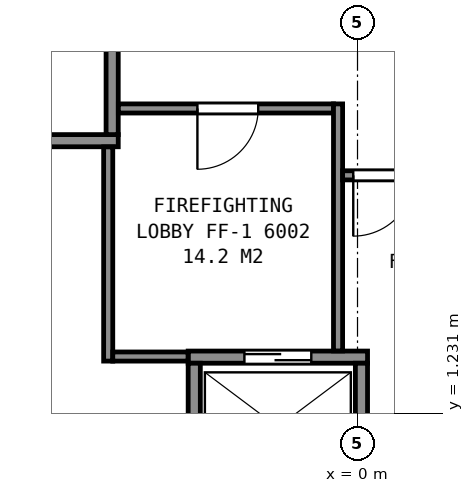
"""IFC4 building model, lengths in metres.
Left out: names, types, materials, properties, quantities, classifications, styles, units other than length and angle.
Written with IfcOpenShell. Run it as: python <this file> out.ifc"""

import sys

from ifc_helpers import new_model, si_unit, direction, frame, frame_2d, origin, place, context, subcontext, project, spatial, rectangle, extrude, element, fill, save


model = new_model("IFC4")
c1 = context("Model", 3, precision=1e-05, world=origin(), true_north=direction((0.0, 1.0)))
c2 = subcontext(c1, "Body", "Model", "MODEL_VIEW")
j1 = project(units=[si_unit("LENGTHUNIT", "METRE"), si_unit("PLANEANGLEUNIT", "RADIAN")], contexts=[c1])
p1 = place(None, origin())
s1 = spatial("IfcSite", under=j1, at=p1, CompositionType="ELEMENT")
p2 = place(p1, origin())
s2 = spatial("IfcBuilding", under=s1, at=p2, CompositionType="ELEMENT")
p3 = place(p2, frame((0.0, 0.0, 239.7)))
s3 = spatial("IfcBuildingStorey", under=s2, at=p3, CompositionType="ELEMENT", Elevation=239.7)
p4 = place(p3, frame((-2.785, 2.15, 0.0), z_axis=(0.0, 0.0, 1.0), x_axis=(1.0, 0.0, 0.0)))
e1 = element("IfcWall", 1, at=p4, inside=s3, PredefinedType="PARTITIONING", context=c2, shape_type="SweptSolid", body=[
    extrude(rectangle(XDim=2.95, YDim=0.2, at=frame_2d((1.475, 0.0))), origin(), (0.0, 0.0, 1.0), 3.7),
])
p5 = place(p4, frame((0.925, 0.0, 0.0)))
e2 = element("IfcOpeningElement", 2, at=p5, cuts=e1, PredefinedType="OPENING", context=c2, shape_type="SweptSolid", body=[
    extrude(rectangle(XDim=1.1, YDim=2.1, at=frame_2d((0.55, 1.05))), frame((0.0, 0.11, 0.0), z_axis=(0.0, -1.0, 0.0), x_axis=(1.0, 0.0, 0.0)), (0.0, 0.0, 1.0), 0.22),
])
p6 = place(p3, frame((-6.285, 5.71, 0.0), z_axis=(0.0, 0.0, 1.0), x_axis=(1.0, 0.0, 0.0)))
e3 = element("IfcWall", 3, at=p6, inside=s3, PredefinedType="PARTITIONING", context=c2, shape_type="SweptSolid", body=[
    extrude(rectangle(XDim=2.35, YDim=0.2, at=frame_2d((1.175, 0.0))), origin(), (0.0, 0.0, 1.0), 3.7),
])
for number, where, z_axis, x_axis in (
    (4, (0.065, 0.1, 0.0), (0.0, 0.0, 1.0), (0.0, 1.0, 0.0)),
    (5, (-2.685, 0.1, 0.0), (0.0, 0.0, 1.0), (0.0, 1.0, 0.0)),
):
    element("IfcWall", number, at=place(p3, frame(where, z_axis=z_axis, x_axis=x_axis)), inside=s3, PredefinedType="PARTITIONING", context=c2, shape_type="SweptSolid", body=[
        extrude(rectangle(XDim=1.95, YDim=0.2, at=frame_2d((0.975, 0.0))), origin(), (0.0, 0.0, 1.0), 3.7),
    ])
p7 = place(p3, frame((-4.035, 5.81, 0.0), z_axis=(0.0, 0.0, 1.0), x_axis=(0.0, 1.0, 0.0)))
e6 = element("IfcWall", 6, at=p7, inside=s3, PredefinedType="PARTITIONING", context=c2, shape_type="SweptSolid", body=[
    extrude(rectangle(XDim=1.75, YDim=0.2, at=frame_2d((0.875, 0.0))), origin(), (0.0, 0.0, 1.0), 3.7),
])
p8 = place(p3, frame((-4.1, 2.085, 0.0), z_axis=(0.0, 0.0, 1.0), x_axis=(0.0, 1.0, 0.0)))
e7 = element("IfcWall", 7, at=p8, inside=s3, PredefinedType="PARTITIONING", context=c2, shape_type="SweptSolid", body=[
    extrude(rectangle(XDim=3.523, YDim=0.15, at=frame_2d((1.761, 0.0))), origin(), (0.0, 0.0, 1.0), 3.45),
])
p9 = place(p3, frame((-4.025, 2.16, 0.0), z_axis=(0.0, 0.0, 1.0), x_axis=(1.0, 0.0, 0.0)))
e8 = element("IfcWall", 8, at=p9, inside=s3, PredefinedType="PARTITIONING", context=c2, shape_type="SweptSolid", body=[
    extrude(rectangle(XDim=1.238, YDim=0.15, at=frame_2d((0.619, 0.0))), origin(), (0.0, 0.0, 1.0), 3.45),
])
p10 = place(p3, frame((-3.933, 6.24, 0.0), z_axis=(0.0, 0.0, 1.0), x_axis=(1.0, 0.0, 0.0)))
e9 = element("IfcWall", 9, at=p10, inside=s3, PredefinedType="PARTITIONING", context=c2, shape_type="SweptSolid", body=[
    extrude(rectangle(XDim=3.538, YDim=0.15, at=frame_2d((1.769, 0.0))), origin(), (0.0, 0.0, 1.0), 3.45),
])
p11 = place(p10, frame((1.3, 0.0, 0.0)))
e10 = element("IfcOpeningElement", 10, at=p11, cuts=e9, PredefinedType="OPENING", context=c2, shape_type="SweptSolid", body=[
    extrude(rectangle(XDim=1.0, YDim=2.1, at=frame_2d((0.5, 1.05))), frame((0.0, 0.085, 0.0), z_axis=(0.0, -1.0, 0.0), x_axis=(1.0, 0.0, 0.0)), (0.0, 0.0, 1.0), 0.17),
])
p12 = place(p3, frame((-0.32, 2.252, 0.0), z_axis=(0.0, 0.0, 1.0), x_axis=(0.0, 1.0, 0.0)))
e11 = element("IfcWall", 11, at=p12, inside=s3, PredefinedType="PARTITIONING", context=c2, shape_type="SweptSolid", body=[
    extrude(rectangle(XDim=4.063, YDim=0.15, at=frame_2d((2.031, 0.0))), origin(), (0.0, 0.0, 1.0), 3.45),
])
p13 = place(p3, frame((-0.245, 5.14, 0.0), z_axis=(0.0, 0.0, 1.0), x_axis=(1.0, 0.0, 0.0)))
e12 = element("IfcWall", 12, at=p13, inside=s3, PredefinedType="PARTITIONING", context=c2, shape_type="SweptSolid", body=[
    extrude(rectangle(XDim=5.11, YDim=0.15, at=frame_2d((2.555, 0.0))), origin(), (0.0, 0.0, 1.0), 3.45),
])
p14 = place(p13, frame((0.175, 0.0, 0.0)))
e13 = element("IfcOpeningElement", 13, at=p14, cuts=e12, PredefinedType="OPENING", context=c2, shape_type="SweptSolid", body=[
    extrude(rectangle(XDim=1.0, YDim=2.1, at=frame_2d((0.5, 1.05))), frame((0.0, 0.085, 0.0), z_axis=(0.0, -1.0, 0.0), x_axis=(1.0, 0.0, 0.0)), (0.0, 0.0, 1.0), 0.17),
])
p15 = place(p3, frame((-4.077, -12.543, 0.0), z_axis=(0.0, 0.0, 1.0), x_axis=(-0.499968768298, 0.866043434665, 0.0)))
e14 = element("IfcWall", 14, at=p15, inside=s3, PredefinedType="PARTITIONING", context=c2, shape_type="SweptSolid", body=[
    extrude(rectangle(XDim=17.703, YDim=0.2, at=frame_2d((8.852, 0.0))), origin(), (0.0, 0.0, 1.0), 2.713),
])
p16 = place(p15, frame((11.052, 0.0, 0.0)))
e15 = element("IfcOpeningElement", 15, at=p16, cuts=e14, PredefinedType="OPENING", context=c2, shape_type="SweptSolid", body=[
    extrude(rectangle(XDim=0.9, YDim=2.1, at=frame_2d((0.45, 1.05))), frame((0.0, 0.11, 0.0), z_axis=(0.0, -1.0, 0.0), x_axis=(1.0, 0.0, 0.0)), (0.0, 0.0, 1.0), 0.22),
])
p17 = place(p15, frame((7.098, 0.0, 0.0)))
e16 = element("IfcOpeningElement", 16, at=p17, cuts=e14, PredefinedType="OPENING", context=c2, shape_type="SweptSolid", body=[
    extrude(rectangle(XDim=0.9, YDim=2.1, at=frame_2d((0.45, 1.05))), frame((0.0, 0.11, 0.0), z_axis=(0.0, -1.0, 0.0), x_axis=(1.0, 0.0, 0.0)), (0.0, 0.0, 1.0), 0.22),
])
p18 = place(p15, frame((2.099, 0.0, 0.0)))
e17 = element("IfcOpeningElement", 17, at=p18, cuts=e14, PredefinedType="OPENING", context=c2, shape_type="SweptSolid", body=[
    extrude(rectangle(XDim=0.9, YDim=2.1, at=frame_2d((0.45, 1.05))), frame((0.0, 0.11, 0.0), z_axis=(0.0, -1.0, 0.0), x_axis=(1.0, 0.0, 0.0)), (0.0, 0.0, 1.0), 0.22),
])
p19 = place(p5, origin())
e18 = element("IfcDoor", 18, at=p19, inside=s3, OperationType="SLIDING_TO_LEFT", PredefinedType="DOOR", context=c2, shape_type="SweptSolid", body=[
    extrude(rectangle(XDim=1.1, YDim=2.1, at=frame_2d((0.55, 1.05))), frame((0.0, 0.025, 0.0), z_axis=(0.0, -1.0, 0.0), x_axis=(1.0, 0.0, 0.0)), (0.0, 0.0, 1.0), 0.05),
])
fill(e2, e18)
p20 = place(p11, origin())
e19 = element("IfcDoor", 19, at=p20, inside=s3, OperationType="SINGLE_SWING_LEFT", PredefinedType="DOOR", context=c2, shape_type="SweptSolid", body=[
    extrude(rectangle(XDim=1.0, YDim=2.1, at=frame_2d((0.5, 1.05))), frame((0.0, 0.025, 0.0), z_axis=(0.0, -1.0, 0.0), x_axis=(1.0, 0.0, 0.0)), (0.0, 0.0, 1.0), 0.05),
])
fill(e10, e19)
p21 = place(p14, origin())
e20 = element("IfcDoor", 20, at=p21, inside=s3, OperationType="SINGLE_SWING_LEFT", PredefinedType="DOOR", context=c2, shape_type="SweptSolid", body=[
    extrude(rectangle(XDim=1.0, YDim=2.1, at=frame_2d((0.5, 1.05))), frame((0.0, 0.025, 0.0), z_axis=(0.0, -1.0, 0.0), x_axis=(1.0, 0.0, 0.0)), (0.0, 0.0, 1.0), 0.05),
])
fill(e13, e20)
save(model, sys.argv[1])
